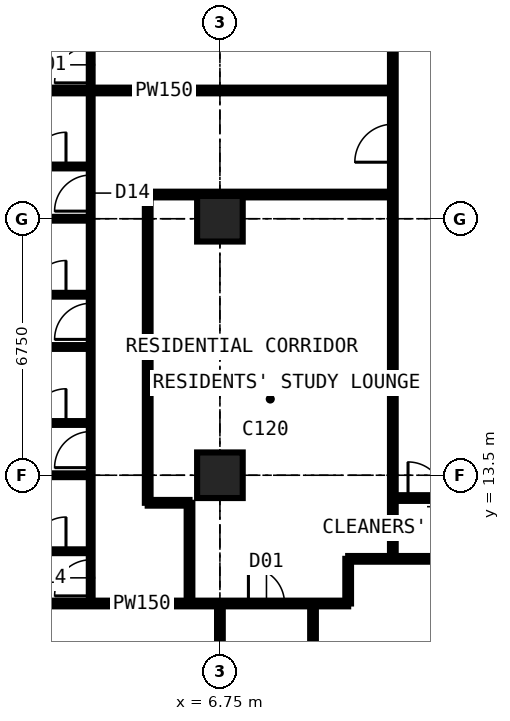
"""IFC4 building model, lengths in metres.
Left out: names, types, materials, properties, quantities, classifications, styles, units other than length and angle.
Written with IfcOpenShell. Run it as: python <this file> out.ifc"""

import sys

from ifc_helpers import new_model, si_unit, direction, frame, frame_2d, origin, origin_2d, place, context, subcontext, project, spatial, rectangle, extrude, element, fill, save


model = new_model("IFC4")
c1 = context("Model", 3, precision=1e-05, world=origin(), true_north=direction((0.0, 1.0)))
c2 = subcontext(c1, "Body", "Model", "MODEL_VIEW")
j1 = project(units=[si_unit("LENGTHUNIT", "METRE"), si_unit("PLANEANGLEUNIT", "RADIAN")], contexts=[c1])
p1 = place(None, origin())
s1 = spatial("IfcSite", under=j1, at=p1, CompositionType="ELEMENT")
p2 = place(p1, origin())
s2 = spatial("IfcBuilding", under=s1, at=p2, CompositionType="ELEMENT")
p3 = place(p2, frame((0.0, 0.0, 181.8)))
s3 = spatial("IfcBuildingStorey", under=s2, at=p3, CompositionType="ELEMENT", Elevation=181.8)
for number, where, z_axis, x_axis in (
    (1, (6.75, 13.5, 0.0), (0.0, 0.0, 1.0), (1.0, 0.0, 0.0)),
    (2, (6.75, 20.25, 0.0), (0.0, 0.0, 1.0), (1.0, 0.0, 0.0)),
):
    element("IfcColumn", number, at=place(p3, frame(where, z_axis=z_axis, x_axis=x_axis)), inside=s3, PredefinedType="COLUMN", context=c2, shape_type="SweptSolid", body=[
        extrude(rectangle(XDim=1.2, YDim=1.2, at=origin_2d()), origin(), (0.0, 0.0, 1.0), 3.6),
    ])
p4 = place(p3, frame((-0.734, 10.125, 0.0), z_axis=(0.0, 0.0, 1.0), x_axis=(1.0, 0.0, 0.0)))
e3 = element("IfcWall", 3, at=p4, inside=s3, PredefinedType="PARTITIONING", context=c2, shape_type="SweptSolid", body=[
    extrude(rectangle(XDim=10.859, YDim=0.15, at=frame_2d((5.429, 0.0))), origin(), (0.0, 0.0, 1.0), 3.375),
])
p5 = place(p4, frame((8.234, 0.0, 0.0)))
e4 = element("IfcOpeningElement", 4, at=p5, cuts=e3, PredefinedType="OPENING", context=c2, shape_type="SweptSolid", body=[
    extrude(rectangle(XDim=0.95, YDim=2.2, at=frame_2d((0.475, 1.1))), frame((0.0, 0.085, 0.0), z_axis=(0.0, -1.0, 0.0), x_axis=(1.0, 0.0, 0.0)), (0.0, 0.0, 1.0), 0.17),
])
p6 = place(p3, frame((-0.734, 13.5, 0.0), z_axis=(0.0, 0.0, 1.0), x_axis=(1.0, 0.0, 0.0)))
e5 = element("IfcWall", 5, at=p6, inside=s3, PredefinedType="PARTITIONING", context=c2, shape_type="SweptSolid", body=[
    extrude(rectangle(XDim=4.084, YDim=0.1, at=frame_2d((2.042, 0.0))), origin(), (0.0, 0.0, 1.0), 2.61),
])
p7 = place(p3, frame((-0.734, 16.875, 0.0), z_axis=(0.0, 0.0, 1.0), x_axis=(1.0, 0.0, 0.0)))
e6 = element("IfcWall", 6, at=p7, inside=s3, PredefinedType="PARTITIONING", context=c2, shape_type="SweptSolid", body=[
    extrude(rectangle(XDim=4.084, YDim=0.1, at=frame_2d((2.042, 0.0))), origin(), (0.0, 0.0, 1.0), 3.375),
])
p8 = place(p3, frame((-0.734, 20.25, 0.0), z_axis=(0.0, 0.0, 1.0), x_axis=(1.0, 0.0, 0.0)))
e7 = element("IfcWall", 7, at=p8, inside=s3, PredefinedType="PARTITIONING", context=c2, shape_type="SweptSolid", body=[
    extrude(rectangle(XDim=4.084, YDim=0.1, at=frame_2d((2.042, 0.0))), origin(), (0.0, 0.0, 1.0), 2.61),
])
p9 = place(p3, frame((-0.734, 23.625, 0.0), z_axis=(0.0, 0.0, 1.0), x_axis=(1.0, 0.0, 0.0)))
e8 = element("IfcWall", 8, at=p9, inside=s3, PredefinedType="PARTITIONING", context=c2, shape_type="SweptSolid", body=[
    extrude(rectangle(XDim=12.034, YDim=0.15, at=frame_2d((6.017, 0.0))), origin(), (0.0, 0.0, 1.0), 3.375),
])
p10 = place(p3, frame((1.15, 11.5, 0.0), z_axis=(0.0, 0.0, 1.0), x_axis=(1.0, 0.0, 0.0)))
e9 = element("IfcWall", 9, at=p10, inside=s3, PredefinedType="PARTITIONING", context=c2, shape_type="SweptSolid", body=[
    extrude(rectangle(XDim=2.2, YDim=0.1, at=frame_2d((1.1, 0.0))), origin(), (0.0, 0.0, 1.0), 3.375),
])
p11 = place(p10, frame((0.65, 0.0, 0.0)))
e10 = element("IfcOpeningElement", 10, at=p11, cuts=e9, PredefinedType="OPENING", context=c2, shape_type="SweptSolid", body=[
    extrude(rectangle(XDim=0.9, YDim=2.2, at=frame_2d((0.45, 1.1))), frame((0.0, 0.06, 0.0), z_axis=(0.0, -1.0, 0.0), x_axis=(1.0, 0.0, 0.0)), (0.0, 0.0, 1.0), 0.12),
])
p12 = place(p3, frame((1.15, 14.875, 0.0), z_axis=(0.0, 0.0, 1.0), x_axis=(1.0, 0.0, 0.0)))
e11 = element("IfcWall", 11, at=p12, inside=s3, PredefinedType="PARTITIONING", context=c2, shape_type="SweptSolid", body=[
    extrude(rectangle(XDim=2.2, YDim=0.1, at=frame_2d((1.1, 0.0))), origin(), (0.0, 0.0, 1.0), 3.375),
])
p13 = place(p12, frame((0.65, 0.0, 0.0)))
e12 = element("IfcOpeningElement", 12, at=p13, cuts=e11, PredefinedType="OPENING", context=c2, shape_type="SweptSolid", body=[
    extrude(rectangle(XDim=0.9, YDim=2.2, at=frame_2d((0.45, 1.1))), frame((0.0, 0.06, 0.0), z_axis=(0.0, -1.0, 0.0), x_axis=(1.0, 0.0, 0.0)), (0.0, 0.0, 1.0), 0.12),
])
p14 = place(p3, frame((1.15, 18.25, 0.0), z_axis=(0.0, 0.0, 1.0), x_axis=(1.0, 0.0, 0.0)))
e13 = element("IfcWall", 13, at=p14, inside=s3, PredefinedType="PARTITIONING", context=c2, shape_type="SweptSolid", body=[
    extrude(rectangle(XDim=2.2, YDim=0.1, at=frame_2d((1.1, 0.0))), origin(), (0.0, 0.0, 1.0), 3.375),
])
p15 = place(p14, frame((0.65, 0.0, 0.0)))
e14 = element("IfcOpeningElement", 14, at=p15, cuts=e13, PredefinedType="OPENING", context=c2, shape_type="SweptSolid", body=[
    extrude(rectangle(XDim=0.9, YDim=2.2, at=frame_2d((0.45, 1.1))), frame((0.0, 0.06, 0.0), z_axis=(0.0, -1.0, 0.0), x_axis=(1.0, 0.0, 0.0)), (0.0, 0.0, 1.0), 0.12),
])
p16 = place(p3, frame((1.15, 21.625, 0.0), z_axis=(0.0, 0.0, 1.0), x_axis=(1.0, 0.0, 0.0)))
e15 = element("IfcWall", 15, at=p16, inside=s3, PredefinedType="PARTITIONING", context=c2, shape_type="SweptSolid", body=[
    extrude(rectangle(XDim=2.2, YDim=0.1, at=frame_2d((1.1, 0.0))), origin(), (0.0, 0.0, 1.0), 3.375),
])
p17 = place(p16, frame((0.65, 0.0, 0.0)))
e16 = element("IfcOpeningElement", 16, at=p17, cuts=e15, PredefinedType="OPENING", context=c2, shape_type="SweptSolid", body=[
    extrude(rectangle(XDim=0.9, YDim=2.2, at=frame_2d((0.45, 1.1))), frame((0.0, 0.06, 0.0), z_axis=(0.0, -1.0, 0.0), x_axis=(1.0, 0.0, 0.0)), (0.0, 0.0, 1.0), 0.12),
])
p18 = place(p3, frame((3.35, 10.125, 0.0), z_axis=(0.0, 0.0, 1.0), x_axis=(0.0, 1.0, 0.0)))
e17 = element("IfcWall", 17, at=p18, inside=s3, PredefinedType="PARTITIONING", context=c2, shape_type="SweptSolid", body=[
    extrude(rectangle(XDim=16.875, YDim=0.1, at=frame_2d((8.438, 0.0))), origin(), (0.0, 0.0, 1.0), 3.375),
])
p19 = place(p18, frame((13.7, 0.0, 0.0)))
e18 = element("IfcOpeningElement", 18, at=p19, cuts=e17, PredefinedType="OPENING", context=c2, shape_type="SweptSolid", body=[
    extrude(rectangle(XDim=0.95, YDim=2.2, at=frame_2d((0.475, 1.1))), frame((0.0, 0.06, 0.0), z_axis=(0.0, -1.0, 0.0), x_axis=(1.0, 0.0, 0.0)), (0.0, 0.0, 1.0), 0.12),
])
p20 = place(p18, frame((0.2, 0.0, 0.0)))
e19 = element("IfcOpeningElement", 19, at=p20, cuts=e17, PredefinedType="OPENING", context=c2, shape_type="SweptSolid", body=[
    extrude(rectangle(XDim=0.95, YDim=2.2, at=frame_2d((0.475, 1.1))), frame((0.0, 0.06, 0.0), z_axis=(0.0, -1.0, 0.0), x_axis=(1.0, 0.0, 0.0)), (0.0, 0.0, 1.0), 0.12),
])
p21 = place(p18, frame((3.575, 0.0, 0.0)))
e20 = element("IfcOpeningElement", 20, at=p21, cuts=e17, PredefinedType="OPENING", context=c2, shape_type="SweptSolid", body=[
    extrude(rectangle(XDim=0.95, YDim=2.2, at=frame_2d((0.475, 1.1))), frame((0.0, 0.06, 0.0), z_axis=(0.0, -1.0, 0.0), x_axis=(1.0, 0.0, 0.0)), (0.0, 0.0, 1.0), 0.12),
])
p22 = place(p18, frame((6.95, 0.0, 0.0)))
e21 = element("IfcOpeningElement", 21, at=p22, cuts=e17, PredefinedType="OPENING", context=c2, shape_type="SweptSolid", body=[
    extrude(rectangle(XDim=0.95, YDim=2.2, at=frame_2d((0.475, 1.1))), frame((0.0, 0.06, 0.0), z_axis=(0.0, -1.0, 0.0), x_axis=(1.0, 0.0, 0.0)), (0.0, 0.0, 1.0), 0.12),
])
p23 = place(p18, frame((10.325, 0.0, 0.0)))
e22 = element("IfcOpeningElement", 22, at=p23, cuts=e17, PredefinedType="OPENING", context=c2, shape_type="SweptSolid", body=[
    extrude(rectangle(XDim=0.95, YDim=2.2, at=frame_2d((0.475, 1.1))), frame((0.0, 0.06, 0.0), z_axis=(0.0, -1.0, 0.0), x_axis=(1.0, 0.0, 0.0)), (0.0, 0.0, 1.0), 0.12),
])
p24 = place(p3, frame((4.85, 12.775, 0.0), z_axis=(0.0, 0.0, 1.0), x_axis=(0.0, 1.0, 0.0)))
e23 = element("IfcWall", 23, at=p24, inside=s3, PredefinedType="PARTITIONING", context=c2, shape_type="SweptSolid", body=[
    extrude(rectangle(XDim=8.113, YDim=0.15, at=frame_2d((4.056, 0.0))), origin(), (0.0, 0.0, 1.0), 3.375),
])
p25 = place(p3, frame((4.85, 12.775, 0.0), z_axis=(0.0, 0.0, 1.0), x_axis=(1.0, 0.0, 0.0)))
e24 = element("IfcWall", 24, at=p25, inside=s3, PredefinedType="PARTITIONING", context=c2, shape_type="SweptSolid", body=[
    extrude(rectangle(XDim=1.1, YDim=0.15, at=frame_2d((0.55, 0.0))), origin(), (0.0, 0.0, 1.0), 3.375),
])
p26 = place(p3, frame((4.85, 20.887, 0.0), z_axis=(0.0, 0.0, 1.0), x_axis=(1.0, 0.0, 0.0)))
e25 = element("IfcWall", 25, at=p26, inside=s3, PredefinedType="PARTITIONING", context=c2, shape_type="SweptSolid", body=[
    extrude(rectangle(XDim=6.45, YDim=0.15, at=frame_2d((3.225, 0.0))), origin(), (0.0, 0.0, 1.0), 3.375),
])
p27 = place(p3, frame((5.95, 10.125, 0.0), z_axis=(0.0, 0.0, 1.0), x_axis=(0.0, 1.0, 0.0)))
e26 = element("IfcWall", 26, at=p27, inside=s3, PredefinedType="PARTITIONING", context=c2, shape_type="SweptSolid", body=[
    extrude(rectangle(XDim=2.65, YDim=0.15, at=frame_2d((1.325, 0.0))), origin(), (0.0, 0.0, 1.0), 3.375),
])
p28 = place(p3, frame((6.75, -0.734, 0.0), z_axis=(0.0, 0.0, 1.0), x_axis=(0.0, 1.0, 0.0)))
e27 = element("IfcWall", 27, at=p28, inside=s3, PredefinedType="PARTITIONING", context=c2, shape_type="SweptSolid", body=[
    extrude(rectangle(XDim=10.859, YDim=0.15, at=frame_2d((5.429, 0.0))), origin(), (0.0, 0.0, 1.0), 2.877),
])
p29 = place(p28, frame((5.834, 0.0, 0.0)))
e28 = element("IfcOpeningElement", 28, at=p29, cuts=e27, PredefinedType="OPENING", context=c2, shape_type="SweptSolid", body=[
    extrude(rectangle(XDim=1.0, YDim=2.2, at=frame_2d((0.5, 1.1))), frame((0.0, 0.085, 0.0), z_axis=(0.0, -1.0, 0.0), x_axis=(1.0, 0.0, 0.0)), (0.0, 0.0, 1.0), 0.17),
])
p30 = place(p3, frame((9.2, 4.85, 0.0), z_axis=(0.0, 0.0, 1.0), x_axis=(0.0, 1.0, 0.0)))
e29 = element("IfcWall", 29, at=p30, inside=s3, PredefinedType="PARTITIONING", context=c2, shape_type="SweptSolid", body=[
    extrude(rectangle(XDim=5.275, YDim=0.15, at=frame_2d((2.637, 0.0))), origin(), (0.0, 0.0, 1.0), 3.375),
])
p31 = place(p3, frame((10.125, 10.125, 0.0), z_axis=(0.0, 0.0, 1.0), x_axis=(0.0, 1.0, 0.0)))
e30 = element("IfcWall", 30, at=p31, inside=s3, PredefinedType="PARTITIONING", context=c2, shape_type="SweptSolid", body=[
    extrude(rectangle(XDim=1.175, YDim=0.15, at=frame_2d((0.587, 0.0))), origin(), (0.0, 0.0, 1.0), 3.375),
])
p32 = place(p3, frame((10.125, 11.3, 0.0), z_axis=(0.0, 0.0, 1.0), x_axis=(1.0, 0.0, 0.0)))
e31 = element("IfcWall", 31, at=p32, inside=s3, PredefinedType="PARTITIONING", context=c2, shape_type="SweptSolid", body=[
    extrude(rectangle(XDim=20.475, YDim=0.15, at=frame_2d((10.238, 0.0))), origin(), (0.0, 0.0, 1.0), 3.375),
])
p33 = place(p32, frame((11.312, 0.0, 0.0)))
e32 = element("IfcOpeningElement", 32, at=p33, cuts=e31, PredefinedType="OPENING", context=c2, shape_type="SweptSolid", body=[
    extrude(rectangle(XDim=1.0, YDim=2.2, at=frame_2d((0.5, 1.1))), frame((0.0, 0.085, 0.0), z_axis=(0.0, -1.0, 0.0), x_axis=(1.0, 0.0, 0.0)), (0.0, 0.0, 1.0), 0.17),
])
p34 = place(p3, frame((11.3, 11.3, 0.0), z_axis=(0.0, 0.0, 1.0), x_axis=(0.0, 1.0, 0.0)))
e33 = element("IfcWall", 33, at=p34, inside=s3, PredefinedType="PARTITIONING", context=c2, shape_type="SweptSolid", body=[
    extrude(rectangle(XDim=19.3, YDim=0.15, at=frame_2d((9.65, 0.0))), origin(), (0.0, 0.0, 1.0), 3.375),
])
p35 = place(p34, frame((13.525, 0.0, 0.0)))
e34 = element("IfcOpeningElement", 34, at=p35, cuts=e33, PredefinedType="OPENING", context=c2, shape_type="SweptSolid", body=[
    extrude(rectangle(XDim=1.0, YDim=2.2, at=frame_2d((0.5, 1.1))), frame((0.0, 0.085, 0.0), z_axis=(0.0, -1.0, 0.0), x_axis=(1.0, 0.0, 0.0)), (0.0, 0.0, 1.0), 0.17),
])
p36 = place(p34, frame((10.438, 0.0, 0.0)))
e35 = element("IfcOpeningElement", 35, at=p36, cuts=e33, PredefinedType="OPENING", context=c2, shape_type="SweptSolid", body=[
    extrude(rectangle(XDim=1.0, YDim=2.2, at=frame_2d((0.5, 1.1))), frame((0.0, 0.085, 0.0), z_axis=(0.0, -1.0, 0.0), x_axis=(1.0, 0.0, 0.0)), (0.0, 0.0, 1.0), 0.17),
])
p37 = place(p3, frame((11.3, 12.9, 0.0), z_axis=(0.0, 0.0, 1.0), x_axis=(1.0, 0.0, 0.0)))
e36 = element("IfcWall", 36, at=p37, inside=s3, PredefinedType="PARTITIONING", context=c2, shape_type="SweptSolid", body=[
    extrude(rectangle(XDim=1.8, YDim=0.15, at=frame_2d((0.9, 0.0))), origin(), (0.0, 0.0, 1.0), 2.806),
])
p38 = place(p37, frame((0.4, 0.0, 0.0)))
e37 = element("IfcOpeningElement", 37, at=p38, cuts=e36, PredefinedType="OPENING", context=c2, shape_type="SweptSolid", body=[
    extrude(rectangle(XDim=0.95, YDim=2.2, at=frame_2d((0.475, 1.1))), frame((0.0, 0.085, 0.0), z_axis=(0.0, -1.0, 0.0), x_axis=(1.0, 0.0, 0.0)), (0.0, 0.0, 1.0), 0.17),
])
p39 = place(p38, origin())
e38 = element("IfcDoor", 38, at=p39, inside=s3, OperationType="SINGLE_SWING_LEFT", PredefinedType="DOOR", context=c2, shape_type="SweptSolid", body=[
    extrude(rectangle(XDim=0.95, YDim=2.2, at=frame_2d((0.475, 1.1))), frame((0.0, 0.025, 0.0), z_axis=(0.0, -1.0, 0.0), x_axis=(1.0, 0.0, 0.0)), (0.0, 0.0, 1.0), 0.05),
])
fill(e37, e38)
p40 = place(p19, origin())
e39 = element("IfcDoor", 39, at=p40, inside=s3, OperationType="SINGLE_SWING_LEFT", PredefinedType="DOOR", context=c2, shape_type="SweptSolid", body=[
    extrude(rectangle(XDim=0.95, YDim=2.2, at=frame_2d((0.475, 1.1))), frame((0.0, 0.025, 0.0), z_axis=(0.0, -1.0, 0.0), x_axis=(1.0, 0.0, 0.0)), (0.0, 0.0, 1.0), 0.05),
])
fill(e18, e39)
p41 = place(p20, origin())
e40 = element("IfcDoor", 40, at=p41, inside=s3, OperationType="SINGLE_SWING_LEFT", PredefinedType="DOOR", context=c2, shape_type="SweptSolid", body=[
    extrude(rectangle(XDim=0.95, YDim=2.2, at=frame_2d((0.475, 1.1))), frame((0.0, 0.025, 0.0), z_axis=(0.0, -1.0, 0.0), x_axis=(1.0, 0.0, 0.0)), (0.0, 0.0, 1.0), 0.05),
])
fill(e19, e40)
p42 = place(p11, origin())
e41 = element("IfcDoor", 41, at=p42, inside=s3, OperationType="SINGLE_SWING_RIGHT", PredefinedType="DOOR", context=c2, shape_type="SweptSolid", body=[
    extrude(rectangle(XDim=0.9, YDim=2.2, at=frame_2d((0.45, 1.1))), frame((0.0, 0.025, 0.0), z_axis=(0.0, -1.0, 0.0), x_axis=(1.0, 0.0, 0.0)), (0.0, 0.0, 1.0), 0.05),
])
fill(e10, e41)
p43 = place(p21, origin())
e42 = element("IfcDoor", 42, at=p43, inside=s3, OperationType="SINGLE_SWING_LEFT", PredefinedType="DOOR", context=c2, shape_type="SweptSolid", body=[
    extrude(rectangle(XDim=0.95, YDim=2.2, at=frame_2d((0.475, 1.1))), frame((0.0, 0.025, 0.0), z_axis=(0.0, -1.0, 0.0), x_axis=(1.0, 0.0, 0.0)), (0.0, 0.0, 1.0), 0.05),
])
fill(e20, e42)
p44 = place(p13, origin())
e43 = element("IfcDoor", 43, at=p44, inside=s3, OperationType="SINGLE_SWING_RIGHT", PredefinedType="DOOR", context=c2, shape_type="SweptSolid", body=[
    extrude(rectangle(XDim=0.9, YDim=2.2, at=frame_2d((0.45, 1.1))), frame((0.0, 0.025, 0.0), z_axis=(0.0, -1.0, 0.0), x_axis=(1.0, 0.0, 0.0)), (0.0, 0.0, 1.0), 0.05),
])
fill(e12, e43)
p45 = place(p22, origin())
e44 = element("IfcDoor", 44, at=p45, inside=s3, OperationType="SINGLE_SWING_LEFT", PredefinedType="DOOR", context=c2, shape_type="SweptSolid", body=[
    extrude(rectangle(XDim=0.95, YDim=2.2, at=frame_2d((0.475, 1.1))), frame((0.0, 0.025, 0.0), z_axis=(0.0, -1.0, 0.0), x_axis=(1.0, 0.0, 0.0)), (0.0, 0.0, 1.0), 0.05),
])
fill(e21, e44)
p46 = place(p15, origin())
e45 = element("IfcDoor", 45, at=p46, inside=s3, OperationType="SINGLE_SWING_RIGHT", PredefinedType="DOOR", context=c2, shape_type="SweptSolid", body=[
    extrude(rectangle(XDim=0.9, YDim=2.2, at=frame_2d((0.45, 1.1))), frame((0.0, 0.025, 0.0), z_axis=(0.0, -1.0, 0.0), x_axis=(1.0, 0.0, 0.0)), (0.0, 0.0, 1.0), 0.05),
])
fill(e14, e45)
p47 = place(p23, origin())
e46 = element("IfcDoor", 46, at=p47, inside=s3, OperationType="SINGLE_SWING_LEFT", PredefinedType="DOOR", context=c2, shape_type="SweptSolid", body=[
    extrude(rectangle(XDim=0.95, YDim=2.2, at=frame_2d((0.475, 1.1))), frame((0.0, 0.025, 0.0), z_axis=(0.0, -1.0, 0.0), x_axis=(1.0, 0.0, 0.0)), (0.0, 0.0, 1.0), 0.05),
])
fill(e22, e46)
p48 = place(p17, origin())
e47 = element("IfcDoor", 47, at=p48, inside=s3, OperationType="SINGLE_SWING_RIGHT", PredefinedType="DOOR", context=c2, shape_type="SweptSolid", body=[
    extrude(rectangle(XDim=0.9, YDim=2.2, at=frame_2d((0.45, 1.1))), frame((0.0, 0.025, 0.0), z_axis=(0.0, -1.0, 0.0), x_axis=(1.0, 0.0, 0.0)), (0.0, 0.0, 1.0), 0.05),
])
fill(e16, e47)
p49 = place(p36, origin())
e48 = element("IfcDoor", 48, at=p49, inside=s3, OperationType="SINGLE_SWING_LEFT", PredefinedType="DOOR", context=c2, shape_type="SweptSolid", body=[
    extrude(rectangle(XDim=1.0, YDim=2.2, at=frame_2d((0.5, 1.1))), frame((0.0, 0.025, 0.0), z_axis=(0.0, -1.0, 0.0), x_axis=(1.0, 0.0, 0.0)), (0.0, 0.0, 1.0), 0.05),
])
fill(e35, e48)
p50 = place(p5, origin())
e49 = element("IfcDoor", 49, at=p50, inside=s3, OperationType="SINGLE_SWING_LEFT", PredefinedType="DOOR", context=c2, shape_type="SweptSolid", body=[
    extrude(rectangle(XDim=0.95, YDim=2.2, at=frame_2d((0.475, 1.1))), frame((0.0, 0.025, 0.0), z_axis=(0.0, -1.0, 0.0), x_axis=(1.0, 0.0, 0.0)), (0.0, 0.0, 1.0), 0.05),
])
fill(e4, e49)
save(model, sys.argv[1])
